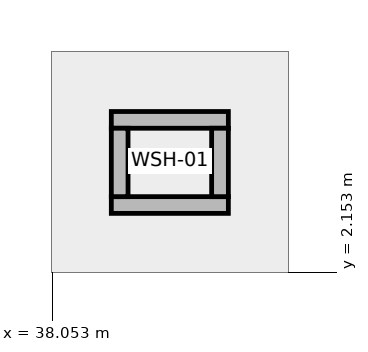
"""IFC4 building model, lengths in metres.
Left out: names, types, materials, properties, quantities, classifications, styles, units other than length and angle.
Written with IfcOpenShell. Run it as: python <this file> out.ifc"""

import sys

from ifc_helpers import new_model, si_unit, direction, frame, frame_2d, origin, place, context, subcontext, project, spatial, rectangle, extrude, element, save


model = new_model("IFC4")
c1 = context("Model", 3, precision=1e-05, world=origin(), true_north=direction((0.0, 1.0)))
c2 = subcontext(c1, "Body", "Model", "MODEL_VIEW")
j1 = project(units=[si_unit("LENGTHUNIT", "METRE"), si_unit("PLANEANGLEUNIT", "RADIAN")], contexts=[c1])
p1 = place(None, origin())
s1 = spatial("IfcSite", under=j1, at=p1, CompositionType="ELEMENT")
p2 = place(p1, origin())
s2 = spatial("IfcBuilding", under=s1, at=p2, CompositionType="ELEMENT")
p3 = place(p2, origin())
s3 = spatial("IfcBuildingStorey", under=s2, at=p3, CompositionType="ELEMENT", Elevation=0.0)
for number, where, z_axis, x_axis in (
    (1, (38.83, 3.04, 0.0), (0.0, 0.0, 1.0), (1.0, 0.0, 0.0)),
    (2, (38.83, 4.16, 0.0), (0.0, 0.0, 1.0), (1.0, 0.0, 0.0)),
):
    element("IfcWall", number, at=place(p3, frame(where, z_axis=z_axis, x_axis=x_axis)), inside=s3, PredefinedType="STANDARD", context=c2, shape_type="SweptSolid", body=[
        extrude(rectangle(XDim=1.54, YDim=0.22, at=frame_2d((0.77, 0.0))), origin(), (0.0, 0.0, 1.0), 2.6),
    ])
for number, where, z_axis, x_axis in (
    (3, (38.94, 3.15, 0.0), (0.0, 0.0, 1.0), (0.0, 1.0, 0.0)),
    (4, (40.26, 3.15, 0.0), (0.0, 0.0, 1.0), (0.0, 1.0, 0.0)),
):
    element("IfcWall", number, at=place(p3, frame(where, z_axis=z_axis, x_axis=x_axis)), inside=s3, PredefinedType="STANDARD", context=c2, shape_type="SweptSolid", body=[
        extrude(rectangle(XDim=0.9, YDim=0.22, at=frame_2d((0.45, 0.0))), origin(), (0.0, 0.0, 1.0), 2.6),
    ])
save(model, sys.argv[1])
